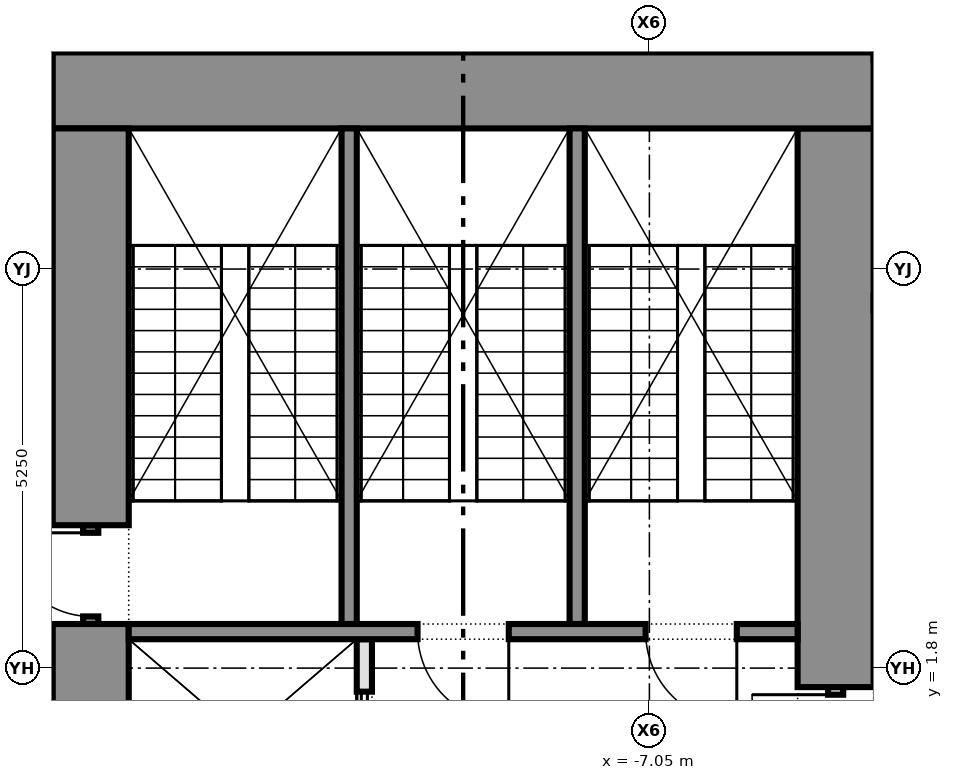
"""IFC4 building model, lengths in metres.
Left out: names, types, materials, properties, quantities, classifications, styles, units other than length and angle.
Written with IfcOpenShell. Run it as: python <this file> out.ifc"""

import sys

from ifc_helpers import new_model, si_unit, direction, frame, frame_2d, origin, place, context, subcontext, project, spatial, rectangle, extrude, element, fill, save


model = new_model("IFC4")
c1 = context("Model", 3, precision=1e-05, world=origin(), true_north=direction((0.0, 1.0)))
c2 = subcontext(c1, "Body", "Model", "MODEL_VIEW")
j1 = project(units=[si_unit("LENGTHUNIT", "METRE"), si_unit("PLANEANGLEUNIT", "RADIAN")], contexts=[c1])
p1 = place(None, origin())
s1 = spatial("IfcSite", under=j1, at=p1, CompositionType="ELEMENT")
p2 = place(p1, origin())
s2 = spatial("IfcBuilding", under=s1, at=p2, CompositionType="ELEMENT")
p3 = place(p2, frame((0.0, 0.0, 82.0)))
s3 = spatial("IfcBuildingStorey", under=s2, at=p3, CompositionType="ELEMENT", Elevation=82.0)
p4 = place(p3, frame((-14.9, 9.4, 0.0), z_axis=(0.0, 0.0, 1.0), x_axis=(1.0, 0.0, 0.0)))
e1 = element("IfcWall", 1, at=p4, inside=s3, PredefinedType="SHEAR", context=c2, shape_type="SweptSolid", body=[
    extrude(rectangle(XDim=10.8, YDim=1.0, at=frame_2d((5.4, 0.0))), origin(), (0.0, 0.0, 1.0), 4.2),
])
p5 = place(p3, frame((-14.4, -3.75, 0.0), z_axis=(0.0, 0.0, 1.0), x_axis=(0.0, 1.0, 0.0)))
e2 = element("IfcWall", 2, at=p5, inside=s3, PredefinedType="SHEAR", context=c2, shape_type="SweptSolid", body=[
    extrude(rectangle(XDim=6.13, YDim=1.0, at=frame_2d((3.065, 0.0))), origin(), (0.0, 0.0, 1.0), 4.2),
])
p6 = place(p3, frame((-14.4, 2.38, 0.0), z_axis=(0.0, 0.0, 1.0), x_axis=(0.0, 1.0, 0.0)))
e3 = element("IfcWall", 3, at=p6, inside=s3, PredefinedType="SHEAR", context=c2, shape_type="SweptSolid", body=[
    extrude(rectangle(XDim=1.3, YDim=0.2, at=frame_2d((0.65, 0.0))), origin(), (0.0, 0.0, 1.0), 2.4),
])
p7 = place(p6, frame((0.1, 0.0, 0.0)))
e4 = element("IfcOpeningElement", 4, at=p7, cuts=e3, PredefinedType="OPENING", context=c2, shape_type="SweptSolid", body=[
    extrude(rectangle(XDim=1.1, YDim=2.1, at=frame_2d((0.55, 1.05))), frame((0.0, 0.11, 0.0), z_axis=(0.0, -1.0, 0.0), x_axis=(1.0, 0.0, 0.0)), (0.0, 0.0, 1.0), 0.22),
])
p8 = place(p3, frame((-14.4, 3.68, 0.0), z_axis=(0.0, 0.0, 1.0), x_axis=(0.0, 1.0, 0.0)))
e5 = element("IfcWall", 5, at=p8, inside=s3, PredefinedType="SHEAR", context=c2, shape_type="SweptSolid", body=[
    extrude(rectangle(XDim=5.22, YDim=1.0, at=frame_2d((2.61, 0.0))), origin(), (0.0, 0.0, 1.0), 4.2),
])
p9 = place(p3, frame((-4.6, 0.25, 0.0), z_axis=(0.0, 0.0, 1.0), x_axis=(0.0, 1.0, 0.0)))
e6 = element("IfcWall", 6, at=p9, inside=s3, PredefinedType="PARTITIONING", context=c2, shape_type="SweptSolid", body=[
    extrude(rectangle(XDim=1.3, YDim=0.2, at=frame_2d((0.65, 0.0))), origin(), (0.0, 0.0, 1.0), 2.4),
])
p10 = place(p9, frame((0.1, 0.0, 0.0)))
e7 = element("IfcOpeningElement", 7, at=p10, cuts=e6, PredefinedType="OPENING", context=c2, shape_type="SweptSolid", body=[
    extrude(rectangle(XDim=1.1, YDim=2.1, at=frame_2d((0.55, 1.05))), frame((0.0, 0.11, 0.0), z_axis=(0.0, -1.0, 0.0), x_axis=(1.0, 0.0, 0.0)), (0.0, 0.0, 1.0), 0.22),
])
p11 = place(p3, frame((-4.6, 1.55, 0.0), z_axis=(0.0, 0.0, 1.0), x_axis=(0.0, 1.0, 0.0)))
e8 = element("IfcWall", 8, at=p11, inside=s3, PredefinedType="SHEAR", context=c2, shape_type="SweptSolid", body=[
    extrude(rectangle(XDim=7.35, YDim=1.0, at=frame_2d((3.675, 0.0))), origin(), (0.0, 0.0, 1.0), 4.2),
])
p12 = place(p3, frame((-10.8, -0.4, 0.0), z_axis=(0.0, 0.0, 1.0), x_axis=(0.0, 1.0, 0.0)))
e9 = element("IfcWall", 9, at=p12, inside=s3, PredefinedType="PARTITIONING", context=c2, shape_type="SweptSolid", body=[
    extrude(rectangle(XDim=2.58, YDim=0.2, at=frame_2d((1.29, 0.0))), origin(), (0.0, 0.0, 1.0), 4.2),
])
p13 = place(p12, frame((0.69, 0.0, 0.0)))
e10 = element("IfcOpeningElement", 10, at=p13, cuts=e9, PredefinedType="OPENING", context=c2, shape_type="SweptSolid", body=[
    extrude(rectangle(XDim=1.2, YDim=2.1, at=frame_2d((0.6, 1.05))), frame((0.0, 0.11, 0.0), z_axis=(0.0, -1.0, 0.0), x_axis=(1.0, 0.0, 0.0)), (0.0, 0.0, 1.0), 0.22),
])
p14 = place(p3, frame((-13.9, 2.28, 0.0), z_axis=(0.0, 0.0, 1.0), x_axis=(1.0, 0.0, 0.0)))
e11 = element("IfcWall", 11, at=p14, inside=s3, PredefinedType="SHEAR", context=c2, shape_type="SweptSolid", body=[
    extrude(rectangle(XDim=8.8, YDim=0.2, at=frame_2d((4.4, 0.0))), origin(), (0.0, 0.0, 1.0), 4.2),
])
p15 = place(p14, frame((3.8, 0.0, 0.0)))
e12 = element("IfcOpeningElement", 12, at=p15, cuts=e11, PredefinedType="OPENING", context=c2, shape_type="SweptSolid", body=[
    extrude(rectangle(XDim=1.2, YDim=2.1, at=frame_2d((0.6, 1.05))), frame((0.0, 0.11, 0.0), z_axis=(0.0, -1.0, 0.0), x_axis=(1.0, 0.0, 0.0)), (0.0, 0.0, 1.0), 0.22),
])
p16 = place(p14, frame((6.8, 0.0, 0.0)))
e13 = element("IfcOpeningElement", 13, at=p16, cuts=e11, PredefinedType="OPENING", context=c2, shape_type="SweptSolid", body=[
    extrude(rectangle(XDim=1.2, YDim=2.1, at=frame_2d((0.6, 1.05))), frame((0.0, 0.11, 0.0), z_axis=(0.0, -1.0, 0.0), x_axis=(1.0, 0.0, 0.0)), (0.0, 0.0, 1.0), 0.22),
])
for number, where, z_axis, x_axis in (
    (14, (-11.0, 2.38, 0.0), (0.0, 0.0, 1.0), (0.0, 1.0, 0.0)),
    (15, (-8.0, 2.38, 0.0), (0.0, 0.0, 1.0), (0.0, 1.0, 0.0)),
):
    element("IfcWall", number, at=place(p3, frame(where, z_axis=z_axis, x_axis=x_axis)), inside=s3, PredefinedType="SHEAR", context=c2, shape_type="SweptSolid", body=[
        extrude(rectangle(XDim=6.52, YDim=0.2, at=frame_2d((3.26, 0.0))), origin(), (0.0, 0.0, 1.0), 4.2),
    ])
p17 = place(p7, origin())
e16 = element("IfcDoor", 16, at=p17, inside=s3, OperationType="SINGLE_SWING_RIGHT", PredefinedType="DOOR", context=c2, shape_type="SweptSolid", body=[
    extrude(rectangle(XDim=1.1, YDim=2.1, at=frame_2d((0.55, 1.05))), frame((0.0, 0.025, 0.0), z_axis=(0.0, -1.0, 0.0), x_axis=(1.0, 0.0, 0.0)), (0.0, 0.0, 1.0), 0.05),
])
fill(e4, e16)
p18 = place(p10, origin())
e17 = element("IfcDoor", 17, at=p18, inside=s3, OperationType="SINGLE_SWING_RIGHT", PredefinedType="DOOR", context=c2, shape_type="SweptSolid", body=[
    extrude(rectangle(XDim=1.1, YDim=2.1, at=frame_2d((0.55, 1.05))), frame((0.0, 0.025, 0.0), z_axis=(0.0, -1.0, 0.0), x_axis=(1.0, 0.0, 0.0)), (0.0, 0.0, 1.0), 0.05),
])
fill(e7, e17)
p19 = place(p13, origin())
e18 = element("IfcDoor", 18, at=p19, inside=s3, OperationType="DOUBLE_DOOR_SLIDING", PredefinedType="DOOR", context=c2, shape_type="SweptSolid", body=[
    extrude(rectangle(XDim=1.2, YDim=2.1, at=frame_2d((0.6, 1.05))), frame((0.0, 0.025, 0.0), z_axis=(0.0, -1.0, 0.0), x_axis=(1.0, 0.0, 0.0)), (0.0, 0.0, 1.0), 0.05),
])
fill(e10, e18)
p20 = place(p15, frame((1.2, 0.0, 0.0), z_axis=(0.0, 0.0, 1.0), x_axis=(-1.0, 0.0, 0.0)))
e19 = element("IfcDoor", 19, at=p20, inside=s3, OperationType="SINGLE_SWING_LEFT", PredefinedType="DOOR", context=c2, shape_type="SweptSolid", body=[
    extrude(rectangle(XDim=1.2, YDim=2.1, at=frame_2d((0.6, 1.05))), frame((0.0, 0.025, 0.0), z_axis=(0.0, -1.0, 0.0), x_axis=(1.0, 0.0, 0.0)), (0.0, 0.0, 1.0), 0.05),
])
fill(e12, e19)
p21 = place(p16, frame((1.2, 0.0, 0.0), z_axis=(0.0, 0.0, 1.0), x_axis=(-1.0, 0.0, 0.0)))
e20 = element("IfcDoor", 20, at=p21, inside=s3, OperationType="SINGLE_SWING_LEFT", PredefinedType="DOOR", context=c2, shape_type="SweptSolid", body=[
    extrude(rectangle(XDim=1.2, YDim=2.1, at=frame_2d((0.6, 1.05))), frame((0.0, 0.025, 0.0), z_axis=(0.0, -1.0, 0.0), x_axis=(1.0, 0.0, 0.0)), (0.0, 0.0, 1.0), 0.05),
])
fill(e13, e20)
save(model, sys.argv[1])
